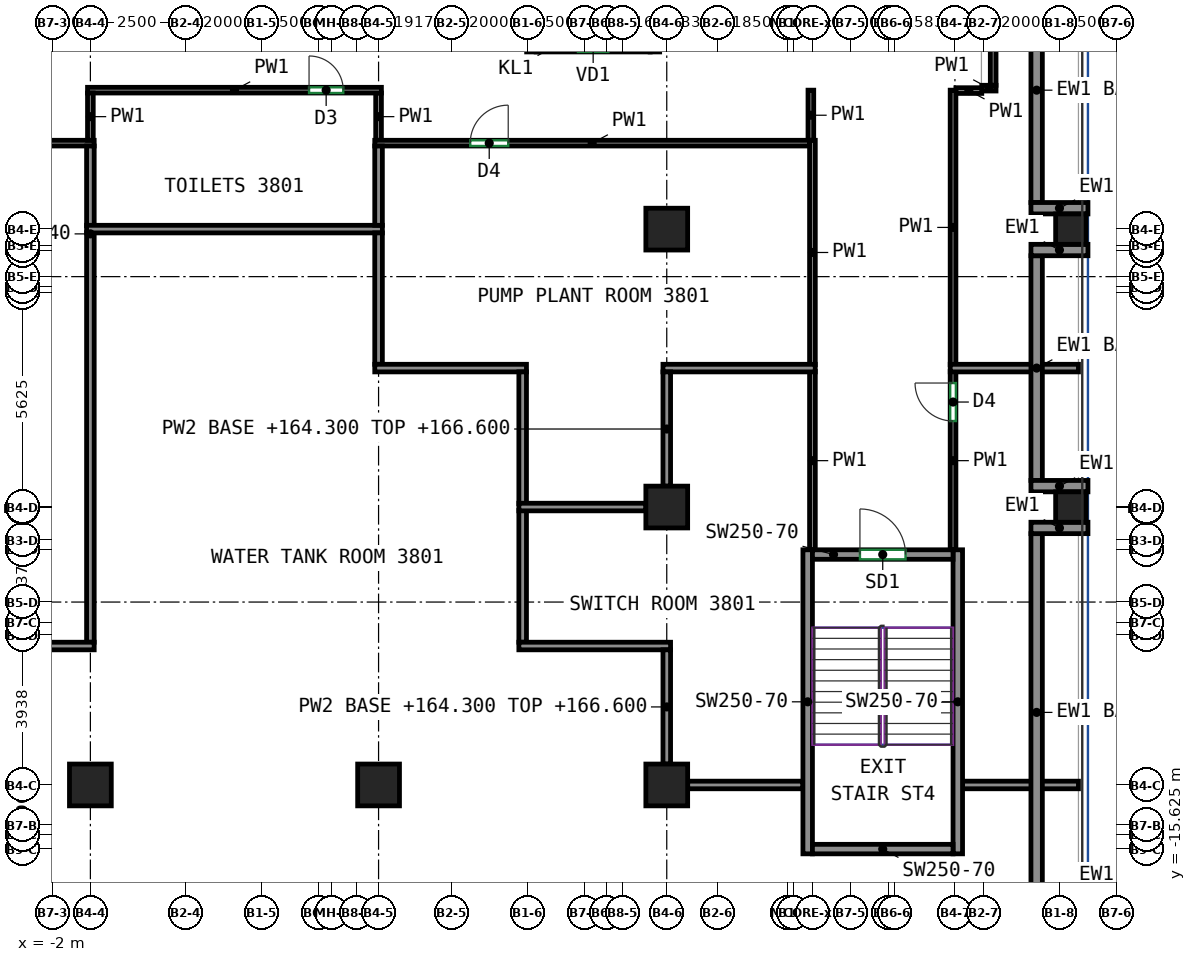
"""IFC4 building model, lengths in metres.
Left out: names, types, materials, properties, quantities, classifications, styles, units other than length and angle.
Written with IfcOpenShell. Run it as: python <this file> out.ifc"""

import sys

from ifc_helpers import new_model, si_unit, direction, frame, frame_2d, origin, origin_2d, place, context, subcontext, project, spatial, rectangle, extrude, source, transform, mapped, element, fill, save


model = new_model("IFC4")
c1 = context("Model", 3, precision=1e-05, world=origin(), true_north=direction((0.0, 1.0)))
c2 = subcontext(c1, "Body", "Model", "MODEL_VIEW")
j1 = project(units=[si_unit("LENGTHUNIT", "METRE"), si_unit("PLANEANGLEUNIT", "RADIAN")], contexts=[c1])
p1 = place(None, origin())
s1 = spatial("IfcSite", under=j1, at=p1, CompositionType="ELEMENT")
p2 = place(p1, origin())
s2 = spatial("IfcBuilding", under=s1, at=p2, CompositionType="ELEMENT")
p3 = place(p2, frame((0.0, 0.0, 164.3)))
s3 = spatial("IfcBuildingStorey", under=s2, at=p3, CompositionType="ELEMENT", Elevation=164.3)
m1 = source(origin(), c2, "Body", "SweptSolid", [
    extrude(rectangle(XDim=1.1, YDim=1.1, at=origin_2d()), origin(), (0.0, 0.0, 1.0), 3.8),
])
for number, where, z_axis, x_axis in (
    (1, (-1.0, -13.938, 0.0), (0.0, 0.0, 1.0), (1.0, 0.0, 0.0)),
    (2, (6.583, -13.938, 0.0), (0.0, 0.0, 1.0), (1.0, 0.0, 0.0)),
):
    element("IfcColumn", number, at=place(p3, frame(where, z_axis=z_axis, x_axis=x_axis)), inside=s3, PredefinedType="COLUMN", context=c2, shape_type="MappedRepresentation", body=[
        mapped(m1, transform((0.0, 0.0, 0.0))),
    ])
m2 = source(origin(), c2, "Body", "SweptSolid", [
    extrude(rectangle(XDim=1.1, YDim=1.1, at=origin_2d()), origin(), (0.0, 0.0, 1.0), 2.3),
])
for number, where, z_axis, x_axis in (
    (3, (14.167, -13.938, 0.0), (0.0, 0.0, 1.0), (1.0, 0.0, 0.0)),
    (4, (14.167, -6.625, 0.0), (0.0, 0.0, 1.0), (1.0, 0.0, 0.0)),
    (5, (14.167, 0.688, 0.0), (0.0, 0.0, 1.0), (1.0, 0.0, 0.0)),
):
    element("IfcColumn", number, at=place(p3, frame(where, z_axis=z_axis, x_axis=x_axis)), inside=s3, PredefinedType="COLUMN", context=c2, shape_type="MappedRepresentation", body=[
        mapped(m2, transform((0.0, 0.0, 0.0))),
    ])
m3 = source(origin(), c2, "Body", "SweptSolid", [
    extrude(rectangle(XDim=0.8, YDim=0.8, at=origin_2d()), origin(), (0.0, 0.0, 1.0), 2.3),
])
for number, where, z_axis, x_axis in (
    (6, (24.8, -6.625, 0.0), (0.0, 0.0, 1.0), (1.0, 0.0, 0.0)),
    (7, (24.8, 0.688, 0.0), (0.0, 0.0, 1.0), (1.0, 0.0, 0.0)),
):
    element("IfcColumn", number, at=place(p3, frame(where, z_axis=z_axis, x_axis=x_axis)), inside=s3, PredefinedType="COLUMN", context=c2, shape_type="MappedRepresentation", body=[
        mapped(m3, transform((0.0, 0.0, 0.0))),
    ])
m4 = source(origin(), c2, "Body", "SweptSolid", [
    extrude(rectangle(XDim=8.0, YDim=0.25, at=frame_2d((4.0, 0.0))), origin(), (0.0, 0.0, 1.0), 3.8),
])
for number, where, z_axis, x_axis in (
    (8, (17.875, -15.75, 0.0), (0.0, 0.0, 1.0), (0.0, 1.0, 0.0)),
    (9, (21.825, -15.75, 0.0), (0.0, 0.0, 1.0), (0.0, 1.0, 0.0)),
):
    element("IfcWall", number, at=place(p3, frame(where, z_axis=z_axis, x_axis=x_axis)), inside=s3, PredefinedType="SHEAR", context=c2, shape_type="MappedRepresentation", body=[
        mapped(m4, transform((0.0, 0.0, 0.0))),
    ])
m5 = source(origin(), c2, "Body", "SweptSolid", [
    extrude(rectangle(XDim=3.7, YDim=0.25, at=frame_2d((1.85, 0.0))), origin(), (0.0, 0.0, 1.0), 3.8),
])
p4 = place(p3, frame((18.0, -15.625, 0.0), z_axis=(0.0, 0.0, 1.0), x_axis=(1.0, 0.0, 0.0)))
e10 = element("IfcWall", 10, at=p4, inside=s3, PredefinedType="SHEAR", context=c2, shape_type="MappedRepresentation", body=[
    mapped(m5, transform((0.0, 0.0, 0.0))),
])
p5 = place(p3, frame((18.0, -7.875, 0.0), z_axis=(0.0, 0.0, 1.0), x_axis=(1.0, 0.0, 0.0)))
e11 = element("IfcWall", 11, at=p5, inside=s3, PredefinedType="SHEAR", context=c2, shape_type="MappedRepresentation", body=[
    mapped(m5, transform((0.0, 0.0, 0.0))),
])
p6 = place(p5, frame((1.25, 0.0, 0.0)))
e12 = element("IfcOpeningElement", 12, at=p6, cuts=e11, PredefinedType="OPENING", context=c2, shape_type="SweptSolid", body=[
    extrude(rectangle(XDim=1.2, YDim=2.1, at=frame_2d((0.6, 1.05))), frame((0.0, 0.135, 0.0), z_axis=(0.0, -1.0, 0.0), x_axis=(1.0, 0.0, 0.0)), (0.0, 0.0, 1.0), 0.27),
])
m6 = source(origin(), c2, "Body", "SweptSolid", [
    extrude(rectangle(XDim=9.407, YDim=0.3, at=frame_2d((4.703, 0.0))), origin(), (0.0, 0.0, 1.0), 1.1),
])
p7 = place(p3, frame((23.9, -16.732, 0.0), z_axis=(0.0, 0.0, 1.0), x_axis=(0.0, 1.0, 0.0)))
e13 = element("IfcWall", 13, at=p7, inside=s3, PredefinedType="SOLIDWALL", context=c2, shape_type="MappedRepresentation", body=[
    mapped(m6, transform((0.0, 0.0, 0.0))),
])
m7 = source(origin(), c2, "Body", "SweptSolid", [
    extrude(rectangle(XDim=1.5, YDim=0.3, at=frame_2d((0.75, 0.0))), origin(), (0.0, 0.0, 1.0), 2.3),
])
p8 = place(p3, frame((25.25, -7.175, 0.0), z_axis=(0.0, 0.0, 1.0), x_axis=(-1.0, 0.0, 0.0)))
e14 = element("IfcWall", 14, at=p8, inside=s3, PredefinedType="SOLIDWALL", context=c2, shape_type="MappedRepresentation", body=[
    mapped(m7, transform((0.0, 0.0, 0.0))),
])
m8 = source(origin(), c2, "Body", "SweptSolid", [
    extrude(rectangle(XDim=5.913, YDim=0.3, at=frame_2d((2.956, 0.0))), origin(), (0.0, 0.0, 1.0), 1.1),
])
p9 = place(p3, frame((23.9, -5.925, 0.0), z_axis=(0.0, 0.0, 1.0), x_axis=(0.0, 1.0, 0.0)))
e15 = element("IfcWall", 15, at=p9, inside=s3, PredefinedType="SOLIDWALL", context=c2, shape_type="MappedRepresentation", body=[
    mapped(m8, transform((0.0, 0.0, 0.0))),
])
for number, where, z_axis, x_axis in (
    (16, (25.25, -6.075, 0.0), (0.0, 0.0, 1.0), (-1.0, 0.0, 0.0)),
    (17, (25.25, 0.137, 0.0), (0.0, 0.0, 1.0), (-1.0, 0.0, 0.0)),
):
    element("IfcWall", number, at=place(p3, frame(where, z_axis=z_axis, x_axis=x_axis)), inside=s3, PredefinedType="SOLIDWALL", context=c2, shape_type="MappedRepresentation", body=[
        mapped(m7, transform((0.0, 0.0, 0.0))),
    ])
p10 = place(p3, frame((23.9, 1.387, 0.0), z_axis=(0.0, 0.0, 1.0), x_axis=(0.0, 1.0, 0.0)))
e18 = element("IfcWall", 18, at=p10, inside=s3, PredefinedType="SOLIDWALL", context=c2, shape_type="MappedRepresentation", body=[
    mapped(m8, transform((0.0, 0.0, 0.0))),
])
p11 = place(p3, frame((25.25, 1.238, 0.0), z_axis=(0.0, 0.0, 1.0), x_axis=(-1.0, 0.0, 0.0)))
e19 = element("IfcWall", 19, at=p11, inside=s3, PredefinedType="SOLIDWALL", context=c2, shape_type="MappedRepresentation", body=[
    mapped(m7, transform((0.0, 0.0, 0.0))),
])
p12 = place(p3, frame((-9.875, 2.95, 0.0), z_axis=(0.0, 0.0, 1.0), x_axis=(1.0, 0.0, 0.0)))
e20 = element("IfcWall", 20, at=p12, inside=s3, PredefinedType="PARTITIONING", context=c2, shape_type="SweptSolid", body=[
    extrude(rectangle(XDim=8.975, YDim=0.15, at=frame_2d((4.488, 0.0))), origin(), (0.0, 0.0, 1.0), 3.8),
])
p13 = place(p3, frame((6.583, 4.269, 0.0), z_axis=(0.0, 0.0, 1.0), x_axis=(0.0, -1.0, 0.0)))
e21 = element("IfcWall", 21, at=p13, inside=s3, PredefinedType="PARTITIONING", context=c2, shape_type="SweptSolid", body=[
    extrude(rectangle(XDim=1.244, YDim=0.15, at=frame_2d((0.622, 0.0))), origin(), (0.0, 0.0, 1.0), 3.8),
])
p14 = place(p3, frame((-1.075, 4.344, 0.0), z_axis=(0.0, 0.0, 1.0), x_axis=(1.0, 0.0, 0.0)))
e22 = element("IfcWall", 22, at=p14, inside=s3, PredefinedType="PARTITIONING", context=c2, shape_type="SweptSolid", body=[
    extrude(rectangle(XDim=7.733, YDim=0.15, at=frame_2d((3.866, 0.0))), origin(), (0.0, 0.0, 1.0), 3.8),
])
p15 = place(p14, frame((5.829, 0.0, 0.0)))
e23 = element("IfcOpeningElement", 23, at=p15, cuts=e22, PredefinedType="OPENING", context=c2, shape_type="SweptSolid", body=[
    extrude(rectangle(XDim=0.9, YDim=2.1, at=frame_2d((0.45, 1.05))), frame((0.0, 0.085, 0.0), z_axis=(0.0, -1.0, 0.0), x_axis=(1.0, 0.0, 0.0)), (0.0, 0.0, 1.0), 0.17),
])
p16 = place(p3, frame((-1.0, 3.025, 0.0), z_axis=(0.0, 0.0, 1.0), x_axis=(0.0, 1.0, 0.0)))
e24 = element("IfcWall", 24, at=p16, inside=s3, PredefinedType="PARTITIONING", context=c2, shape_type="SweptSolid", body=[
    extrude(rectangle(XDim=1.244, YDim=0.15, at=frame_2d((0.622, 0.0))), origin(), (0.0, 0.0, 1.0), 3.8),
])
p17 = place(p3, frame((18.0, -2.879, 0.0), z_axis=(0.0, 0.0, 1.0), x_axis=(0.0, 1.0, 0.0)))
e25 = element("IfcWall", 25, at=p17, inside=s3, PredefinedType="PARTITIONING", context=c2, shape_type="SweptSolid", body=[
    extrude(rectangle(XDim=5.904, YDim=0.15, at=frame_2d((2.952, 0.0))), origin(), (0.0, 0.0, 1.0), 3.8),
])
p18 = place(p3, frame((17.959, 4.344, 0.0), z_axis=(0.0, 0.0, 1.0), x_axis=(0.0, -1.0, 0.0)))
e26 = element("IfcWall", 26, at=p18, inside=s3, PredefinedType="PARTITIONING", context=c2, shape_type="SweptSolid", body=[
    extrude(rectangle(XDim=1.319, YDim=0.15, at=frame_2d((0.66, 0.0))), origin(), (0.0, 0.0, 1.0), 3.8),
])
p19 = place(p3, frame((6.483, 2.95, 0.0), z_axis=(0.0, 0.0, 1.0), x_axis=(1.0, 0.0, 0.0)))
e27 = element("IfcWall", 27, at=p19, inside=s3, PredefinedType="PARTITIONING", context=c2, shape_type="SweptSolid", body=[
    extrude(rectangle(XDim=11.442, YDim=0.15, at=frame_2d((5.721, 0.0))), origin(), (0.0, 0.0, 1.0), 3.8),
])
p20 = place(p19, frame((2.512, 0.0, 0.0)))
e28 = element("IfcOpeningElement", 28, at=p20, cuts=e27, PredefinedType="OPENING", context=c2, shape_type="SweptSolid", body=[
    extrude(rectangle(XDim=1.0, YDim=2.1, at=frame_2d((0.5, 1.05))), frame((0.0, 0.085, 0.0), z_axis=(0.0, -1.0, 0.0), x_axis=(1.0, 0.0, 0.0)), (0.0, 0.0, 1.0), 0.17),
])
p21 = place(p3, frame((21.7, -7.75, 0.0), z_axis=(0.0, 0.0, 1.0), x_axis=(0.0, 1.0, 0.0)))
e29 = element("IfcWall", 29, at=p21, inside=s3, PredefinedType="PARTITIONING", context=c2, shape_type="SweptSolid", body=[
    extrude(rectangle(XDim=4.691, YDim=0.15, at=frame_2d((2.345, 0.0))), origin(), (0.0, 0.0, 1.0), 3.8),
])
p22 = place(p21, frame((3.388, 0.0, 0.0)))
e30 = element("IfcOpeningElement", 30, at=p22, cuts=e29, PredefinedType="OPENING", context=c2, shape_type="SweptSolid", body=[
    extrude(rectangle(XDim=1.0, YDim=2.1, at=frame_2d((0.5, 1.05))), frame((0.0, 0.085, 0.0), z_axis=(0.0, -1.0, 0.0), x_axis=(1.0, 0.0, 0.0)), (0.0, 0.0, 1.0), 0.17),
])
p23 = place(p3, frame((18.0, -7.75, 0.0), z_axis=(0.0, 0.0, 1.0), x_axis=(0.0, 1.0, 0.0)))
e31 = element("IfcWall", 31, at=p23, inside=s3, PredefinedType="PARTITIONING", context=c2, shape_type="SweptSolid", body=[
    extrude(rectangle(XDim=4.691, YDim=0.15, at=frame_2d((2.345, 0.0))), origin(), (0.0, 0.0, 1.0), 3.8),
])
p24 = place(p3, frame((22.756, 4.472, 0.0), z_axis=(0.0, 0.0, 1.0), x_axis=(0.0, 1.0, 0.0)))
e32 = element("IfcWall", 32, at=p24, inside=s3, PredefinedType="PARTITIONING", context=c2, shape_type="SweptSolid", body=[
    extrude(rectangle(XDim=5.325, YDim=0.15, at=frame_2d((2.663, 0.0))), origin(), (0.0, 0.0, 1.0), 3.8),
])
p25 = place(p3, frame((22.456, 4.397, 0.0), z_axis=(0.0, 0.0, 1.0), x_axis=(1.0, 0.0, 0.0)))
e33 = element("IfcWall", 33, at=p25, inside=s3, PredefinedType="PARTITIONING", context=c2, shape_type="SweptSolid", body=[
    extrude(rectangle(XDim=0.375, YDim=0.15, at=frame_2d((0.188, 0.0))), origin(), (0.0, 0.0, 1.0), 3.8),
])
p26 = place(p3, frame((21.775, 4.333, 0.0), z_axis=(0.0, 0.0, 1.0), x_axis=(1.0, 0.0, 0.0)))
e34 = element("IfcWall", 34, at=p26, inside=s3, PredefinedType="PARTITIONING", context=c2, shape_type="SweptSolid", body=[
    extrude(rectangle(XDim=0.681, YDim=0.15, at=frame_2d((0.341, 0.0))), origin(), (0.0, 0.0, 1.0), 3.8),
])
p27 = place(p3, frame((21.7, -2.879, 0.0), z_axis=(0.0, 0.0, 1.0), x_axis=(0.0, 1.0, 0.0)))
e35 = element("IfcWall", 35, at=p27, inside=s3, PredefinedType="PARTITIONING", context=c2, shape_type="SweptSolid", body=[
    extrude(rectangle(XDim=7.223, YDim=0.15, at=frame_2d((3.611, 0.0))), origin(), (0.0, 0.0, 1.0), 3.8),
])
p28 = place(p3, frame((-1.0, -10.182, 0.0), z_axis=(0.0, 0.0, 1.0), x_axis=(0.0, 1.0, 0.0)))
e36 = element("IfcWall", 36, at=p28, inside=s3, PredefinedType="PARTITIONING", context=c2, shape_type="SweptSolid", body=[
    extrude(rectangle(XDim=10.78, YDim=0.2, at=frame_2d((5.39, 0.0))), origin(), (0.0, 0.0, 1.0), 3.8),
])
p29 = place(p3, frame((-9.874, -10.282, 0.0), z_axis=(0.0, 0.0, 1.0), x_axis=(1.0, 0.0, 0.0)))
e37 = element("IfcWall", 37, at=p29, inside=s3, PredefinedType="PARTITIONING", context=c2, shape_type="SweptSolid", body=[
    extrude(rectangle(XDim=8.974, YDim=0.2, at=frame_2d((4.487, 0.0))), origin(), (0.0, 0.0, 1.0), 3.8),
])
p30 = place(p3, frame((-1.0, 0.778, 0.0), z_axis=(0.0, 0.0, 1.0), x_axis=(0.0, 1.0, 0.0)))
e38 = element("IfcWall", 38, at=p30, inside=s3, PredefinedType="PARTITIONING", context=c2, shape_type="SweptSolid", body=[
    extrude(rectangle(XDim=2.096, YDim=0.2, at=frame_2d((1.048, 0.0))), origin(), (0.0, 0.0, 1.0), 3.8),
])
p31 = place(p3, frame((6.683, 0.688, 0.0), z_axis=(0.0, 0.0, 1.0), x_axis=(-1.0, 0.0, 0.0)))
e39 = element("IfcWall", 39, at=p31, inside=s3, PredefinedType="PARTITIONING", context=c2, shape_type="SweptSolid", body=[
    extrude(rectangle(XDim=7.783, YDim=0.2, at=frame_2d((3.892, 0.0))), origin(), (0.0, 0.0, 1.0), 3.8),
])
p32 = place(p3, frame((6.583, -2.869, 0.0), z_axis=(0.0, 0.0, 1.0), x_axis=(0.0, 1.0, 0.0)))
e40 = element("IfcWall", 40, at=p32, inside=s3, PredefinedType="PARTITIONING", context=c2, shape_type="SweptSolid", body=[
    extrude(rectangle(XDim=3.457, YDim=0.2, at=frame_2d((1.729, 0.0))), origin(), (0.0, 0.0, 1.0), 3.8),
])
p33 = place(p3, frame((6.483, -2.969, 0.0), z_axis=(0.0, 0.0, 1.0), x_axis=(1.0, 0.0, 0.0)))
e41 = element("IfcWall", 41, at=p33, inside=s3, PredefinedType="PARTITIONING", context=c2, shape_type="SweptSolid", body=[
    extrude(rectangle(XDim=3.992, YDim=0.2, at=frame_2d((1.996, 0.0))), origin(), (0.0, 0.0, 1.0), 3.8),
])
p34 = place(p3, frame((10.375, -6.535, 0.0), z_axis=(0.0, 0.0, 1.0), x_axis=(0.0, 1.0, 0.0)))
e42 = element("IfcWall", 42, at=p34, inside=s3, PredefinedType="PARTITIONING", context=c2, shape_type="SweptSolid", body=[
    extrude(rectangle(XDim=3.466, YDim=0.2, at=frame_2d((1.733, 0.0))), origin(), (0.0, 0.0, 1.0), 3.8),
])
p35 = place(p3, frame((10.375, -10.182, 0.0), z_axis=(0.0, 0.0, 1.0), x_axis=(0.0, 1.0, 0.0)))
e43 = element("IfcWall", 43, at=p35, inside=s3, PredefinedType="PARTITIONING", context=c2, shape_type="SweptSolid", body=[
    extrude(rectangle(XDim=3.467, YDim=0.2, at=frame_2d((1.733, 0.0))), origin(), (0.0, 0.0, 1.0), 3.8),
])
p36 = place(p3, frame((10.275, -10.282, 0.0), z_axis=(0.0, 0.0, 1.0), x_axis=(1.0, 0.0, 0.0)))
e44 = element("IfcWall", 44, at=p36, inside=s3, PredefinedType="PARTITIONING", context=c2, shape_type="SweptSolid", body=[
    extrude(rectangle(XDim=3.992, YDim=0.2, at=frame_2d((1.996, 0.0))), origin(), (0.0, 0.0, 1.0), 3.8),
])
p37 = place(p3, frame((14.167, -13.387, 0.0), z_axis=(0.0, 0.0, 1.0), x_axis=(0.0, 1.0, 0.0)))
e45 = element("IfcWall", 45, at=p37, inside=s3, PredefinedType="PARTITIONING", context=c2, shape_type="SweptSolid", body=[
    extrude(rectangle(XDim=3.005, YDim=0.2, at=frame_2d((1.502, 0.0))), origin(), (0.0, 0.0, 1.0), 2.3),
])
p38 = place(p3, frame((14.717, -13.938, 0.0), z_axis=(0.0, 0.0, 1.0), x_axis=(1.0, 0.0, 0.0)))
e46 = element("IfcWall", 46, at=p38, inside=s3, PredefinedType="PARTITIONING", context=c2, shape_type="SweptSolid", body=[
    extrude(rectangle(XDim=3.033, YDim=0.2, at=frame_2d((1.517, 0.0))), origin(), (0.0, 0.0, 1.0), 3.8),
])
p39 = place(p3, frame((21.95, -13.938, 0.0), z_axis=(0.0, 0.0, 1.0), x_axis=(1.0, 0.0, 0.0)))
e47 = element("IfcWall", 47, at=p39, inside=s3, PredefinedType="PARTITIONING", context=c2, shape_type="SweptSolid", body=[
    extrude(rectangle(XDim=1.83, YDim=0.2, at=frame_2d((0.915, 0.0))), origin(), (0.0, 0.0, 1.0), 3.8),
])
p40 = place(p3, frame((24.02, -13.938, 0.0), z_axis=(0.0, 0.0, 1.0), x_axis=(1.0, 0.0, 0.0)))
e48 = element("IfcWall", 48, at=p40, inside=s3, PredefinedType="PARTITIONING", context=c2, shape_type="SweptSolid", body=[
    extrude(rectangle(XDim=0.98, YDim=0.2, at=frame_2d((0.49, 0.0))), origin(), (0.0, 0.0, 1.0), 3.8),
])
p41 = place(p3, frame((6.583, 0.788, 0.0), z_axis=(0.0, 0.0, 1.0), x_axis=(0.0, 1.0, 0.0)))
e49 = element("IfcWall", 49, at=p41, inside=s3, PredefinedType="PARTITIONING", context=c2, shape_type="SweptSolid", body=[
    extrude(rectangle(XDim=2.086, YDim=0.2, at=frame_2d((1.043, 0.0))), origin(), (0.0, 0.0, 1.0), 3.8),
])
p42 = place(p3, frame((14.067, -2.969, 0.0), z_axis=(0.0, 0.0, 1.0), x_axis=(1.0, 0.0, 0.0)))
e50 = element("IfcWall", 50, at=p42, inside=s3, PredefinedType="PARTITIONING", context=c2, shape_type="SweptSolid", body=[
    extrude(rectangle(XDim=4.007, YDim=0.2, at=frame_2d((2.003, 0.0))), origin(), (0.0, 0.0, 1.0), 3.8),
])
p43 = place(p3, frame((14.167, -6.075, 0.0), z_axis=(0.0, 0.0, 1.0), x_axis=(0.0, 1.0, 0.0)))
e51 = element("IfcWall", 51, at=p43, inside=s3, PredefinedType="PARTITIONING", context=c2, shape_type="SweptSolid", body=[
    extrude(rectangle(XDim=3.006, YDim=0.2, at=frame_2d((1.503, 0.0))), origin(), (0.0, 0.0, 1.0), 2.3),
])
p44 = place(p3, frame((10.275, -6.625, 0.0), z_axis=(0.0, 0.0, 1.0), x_axis=(1.0, 0.0, 0.0)))
e52 = element("IfcWall", 52, at=p44, inside=s3, PredefinedType="PARTITIONING", context=c2, shape_type="SweptSolid", body=[
    extrude(rectangle(XDim=3.342, YDim=0.2, at=frame_2d((1.671, 0.0))), origin(), (0.0, 0.0, 1.0), 3.8),
])
p45 = place(p3, frame((21.626, -2.969, 0.0), z_axis=(0.0, 0.0, 1.0), x_axis=(1.0, 0.0, 0.0)))
e53 = element("IfcWall", 53, at=p45, inside=s3, PredefinedType="PARTITIONING", context=c2, shape_type="SweptSolid", body=[
    extrude(rectangle(XDim=2.154, YDim=0.2, at=frame_2d((1.077, 0.0))), origin(), (0.0, 0.0, 1.0), 3.8),
])
p46 = place(p3, frame((24.02, -2.969, 0.0), z_axis=(0.0, 0.0, 1.0), x_axis=(1.0, 0.0, 0.0)))
e54 = element("IfcWall", 54, at=p46, inside=s3, PredefinedType="PARTITIONING", context=c2, shape_type="SweptSolid", body=[
    extrude(rectangle(XDim=0.98, YDim=0.2, at=frame_2d((0.49, 0.0))), origin(), (0.0, 0.0, 1.0), 3.8),
])
p47 = place(p6, origin())
e55 = element("IfcDoor", 55, at=p47, inside=s3, OperationType="DOUBLE_DOOR_SINGLE_SWING", PredefinedType="DOOR", context=c2, shape_type="SweptSolid", body=[
    extrude(rectangle(XDim=1.2, YDim=2.1, at=frame_2d((0.6, 1.05))), frame((0.0, 0.025, 0.0), z_axis=(0.0, -1.0, 0.0), x_axis=(1.0, 0.0, 0.0)), (0.0, 0.0, 1.0), 0.05),
])
fill(e12, e55)
p48 = place(p22, origin())
e56 = element("IfcDoor", 56, at=p48, inside=s3, OperationType="SINGLE_SWING_RIGHT", PredefinedType="DOOR", context=c2, shape_type="SweptSolid", body=[
    extrude(rectangle(XDim=1.0, YDim=2.1, at=frame_2d((0.5, 1.05))), frame((0.0, 0.025, 0.0), z_axis=(0.0, -1.0, 0.0), x_axis=(1.0, 0.0, 0.0)), (0.0, 0.0, 1.0), 0.05),
])
fill(e30, e56)
p49 = place(p20, origin())
e57 = element("IfcDoor", 57, at=p49, inside=s3, OperationType="SINGLE_SWING_RIGHT", PredefinedType="DOOR", context=c2, shape_type="SweptSolid", body=[
    extrude(rectangle(XDim=1.0, YDim=2.1, at=frame_2d((0.5, 1.05))), frame((0.0, 0.025, 0.0), z_axis=(0.0, -1.0, 0.0), x_axis=(1.0, 0.0, 0.0)), (0.0, 0.0, 1.0), 0.05),
])
fill(e28, e57)
p50 = place(p15, origin())
e58 = element("IfcDoor", 58, at=p50, inside=s3, OperationType="SINGLE_SWING_LEFT", PredefinedType="DOOR", context=c2, shape_type="SweptSolid", body=[
    extrude(rectangle(XDim=0.9, YDim=2.1, at=frame_2d((0.45, 1.05))), frame((0.0, 0.025, 0.0), z_axis=(0.0, -1.0, 0.0), x_axis=(1.0, 0.0, 0.0)), (0.0, 0.0, 1.0), 0.05),
])
fill(e23, e58)
save(model, sys.argv[1])
